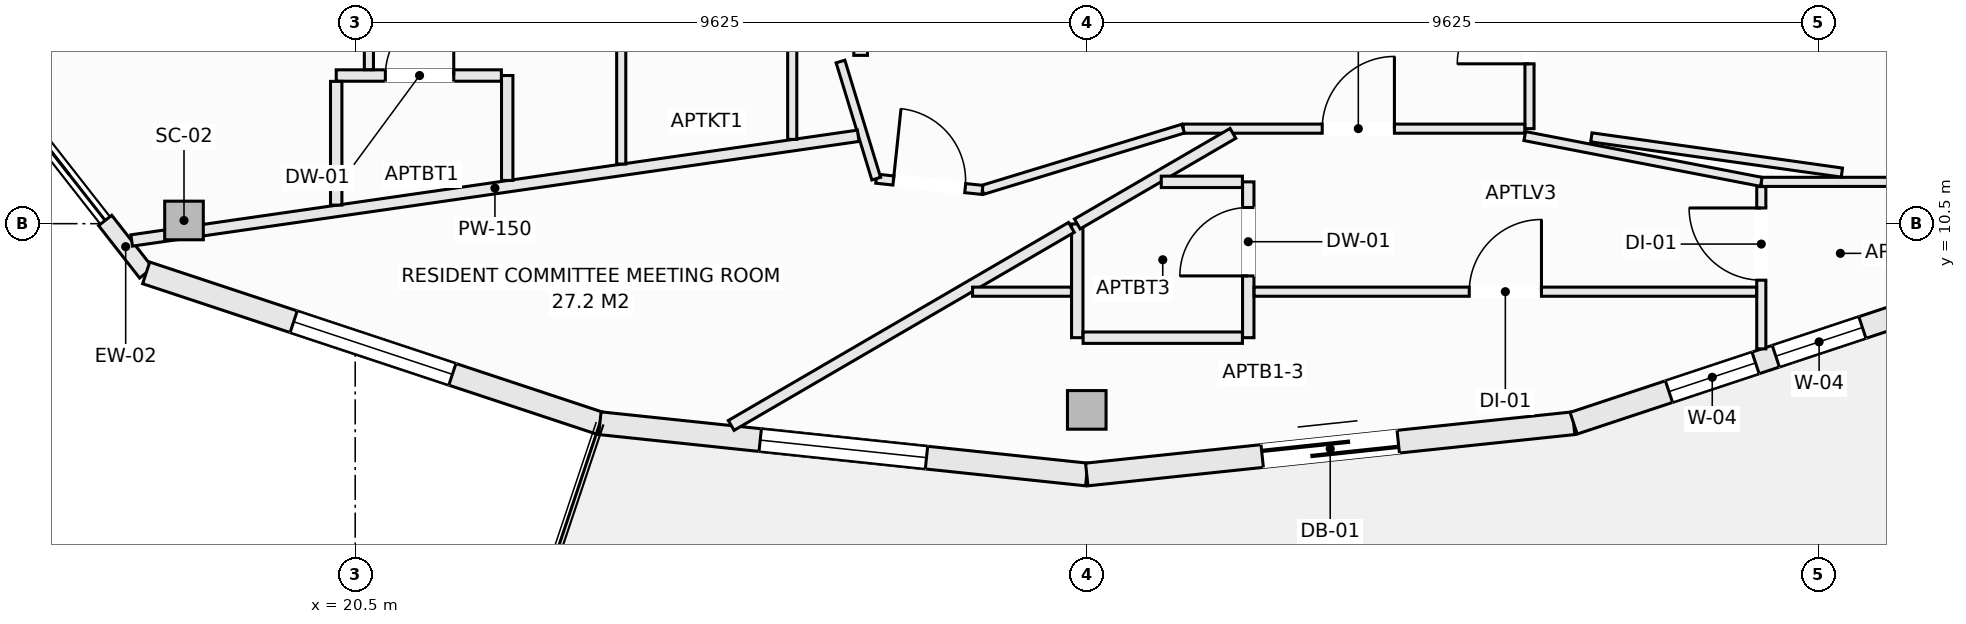
"""IFC4 building model, lengths in metres.
Left out: names, types, materials, properties, quantities, classifications, styles, units other than length and angle.
Written with IfcOpenShell. Run it as: python <this file> out.ifc"""

import sys

from ifc_helpers import new_model, si_unit, direction, frame, frame_2d, origin, origin_2d, place, context, subcontext, project, spatial, rectangle, hollow_rectangle, extrude, element, fill, save


model = new_model("IFC4")
c1 = context("Model", 3, precision=1e-05, world=origin(), true_north=direction((0.0, 1.0)))
c2 = subcontext(c1, "Body", "Model", "MODEL_VIEW")
j1 = project(units=[si_unit("LENGTHUNIT", "METRE"), si_unit("PLANEANGLEUNIT", "RADIAN")], contexts=[c1])
p1 = place(None, origin())
s1 = spatial("IfcSite", under=j1, at=p1, CompositionType="ELEMENT")
p2 = place(p1, origin())
s2 = spatial("IfcBuilding", under=s1, at=p2, CompositionType="ELEMENT")
p3 = place(p2, frame((0.0, 0.0, 226.1)))
s3 = spatial("IfcBuildingStorey", under=s2, at=p3, CompositionType="ELEMENT", Elevation=226.1)
for number, where, z_axis, x_axis in (
    (1, (18.247, 10.542, -0.27), (0.0, 0.0, 1.0), (1.0, 0.0, 0.0)),
    (2, (30.125, 8.05, -0.27), (0.0, 0.0, 1.0), (1.0, 0.0, 0.0)),
):
    element("IfcColumn", number, at=place(p3, frame(where, z_axis=z_axis, x_axis=x_axis)), inside=s3, PredefinedType="COLUMN", context=c2, shape_type="SweptSolid", body=[
        extrude(hollow_rectangle(XDim=0.508, YDim=0.508, WallThickness=0.019, at=origin_2d()), origin(), (0.0, 0.0, 1.0), 3.3),
    ])
p4 = place(p3, frame((17.21, 10.542, 0.0), z_axis=(0.0, 0.0, 1.0), x_axis=(0.616466126167, -0.787381429352, 0.0)))
e3 = element("IfcWall", 3, at=p4, inside=s3, PredefinedType="SOLIDWALL", context=c2, shape_type="SweptSolid", body=[
    extrude(rectangle(XDim=0.876, YDim=0.22, at=frame_2d((0.438, 0.0))), origin(), (0.0, 0.0, 1.0), 2.605),
])
p5 = place(p3, frame((17.75, 9.853, 0.0), z_axis=(0.0, 0.0, 1.0), x_axis=(0.949240877604, -0.314550085495, 0.0)))
e4 = element("IfcWall", 4, at=p5, inside=s3, PredefinedType="SOLIDWALL", context=c2, shape_type="SweptSolid", body=[
    extrude(rectangle(XDim=6.288, YDim=0.3, at=frame_2d((3.144, 0.0))), origin(), (0.0, 0.0, 1.0), 2.605),
])
p6 = place(p5, frame((2.044, 0.0, 0.72)))
e5 = element("IfcOpeningElement", 5, at=p6, cuts=e4, PredefinedType="OPENING", context=c2, shape_type="SweptSolid", body=[
    extrude(rectangle(XDim=2.2, YDim=1.65, at=frame_2d((1.1, 0.825))), frame((0.0, 0.16, 0.0), z_axis=(0.0, -1.0, 0.0), x_axis=(1.0, 0.0, 0.0)), (0.0, 0.0, 1.0), 0.32),
])
p7 = place(p3, frame((23.719, 7.875, 0.0), z_axis=(0.0, 0.0, 1.0), x_axis=(0.994497142298, -0.104763705363, 0.0)))
e6 = element("IfcWall", 6, at=p7, inside=s3, PredefinedType="SOLIDWALL", context=c2, shape_type="SweptSolid", body=[
    extrude(rectangle(XDim=6.441, YDim=0.3, at=frame_2d((3.221, 0.0))), origin(), (0.0, 0.0, 1.0), 2.605),
])
p8 = place(p7, frame((2.121, 0.0, 0.72)))
e7 = element("IfcOpeningElement", 7, at=p8, cuts=e6, PredefinedType="OPENING", context=c2, shape_type="SweptSolid", body=[
    extrude(rectangle(XDim=2.2, YDim=1.65, at=frame_2d((1.1, 0.825))), frame((0.0, 0.16, 0.0), z_axis=(0.0, -1.0, 0.0), x_axis=(1.0, 0.0, 0.0)), (0.0, 0.0, 1.0), 0.32),
])
p9 = place(p3, frame((30.125, 7.2, 0.0), z_axis=(0.0, 0.0, 1.0), x_axis=(0.994497142298, 0.104763705363, 0.0)))
e8 = element("IfcWall", 8, at=p9, inside=s3, PredefinedType="SOLIDWALL", context=c2, shape_type="SweptSolid", body=[
    extrude(rectangle(XDim=6.441, YDim=0.3, at=frame_2d((3.221, 0.0))), origin(), (0.0, 0.0, 1.0), 2.605),
])
p10 = place(p9, frame((2.321, 0.0, 0.0)))
e9 = element("IfcOpeningElement", 9, at=p10, cuts=e8, PredefinedType="OPENING", context=c2, shape_type="SweptSolid", body=[
    extrude(rectangle(XDim=1.8, YDim=2.25, at=frame_2d((0.9, 1.125))), frame((0.0, 0.16, 0.0), z_axis=(0.0, -1.0, 0.0), x_axis=(1.0, 0.0, 0.0)), (0.0, 0.0, 1.0), 0.32),
])
p11 = place(p3, frame((36.531, 7.875, 0.0), z_axis=(0.0, 0.0, 1.0), x_axis=(0.949240877604, 0.314550085495, 0.0)))
e10 = element("IfcWall", 10, at=p11, inside=s3, PredefinedType="SOLIDWALL", context=c2, shape_type="SweptSolid", body=[
    extrude(rectangle(XDim=6.288, YDim=0.3, at=frame_2d((3.144, 0.0))), origin(), (0.0, 0.0, 1.0), 2.605),
])
p12 = place(p11, frame((1.322, 0.0, 0.72)))
e11 = element("IfcOpeningElement", 11, at=p12, cuts=e10, PredefinedType="OPENING", context=c2, shape_type="SweptSolid", body=[
    extrude(rectangle(XDim=1.2, YDim=1.65, at=frame_2d((0.6, 0.825))), frame((0.0, 0.16, 0.0), z_axis=(0.0, -1.0, 0.0), x_axis=(1.0, 0.0, 0.0)), (0.0, 0.0, 1.0), 0.32),
])
p13 = place(p11, frame((2.802, 0.0, 0.72)))
e12 = element("IfcOpeningElement", 12, at=p13, cuts=e10, PredefinedType="OPENING", context=c2, shape_type="SweptSolid", body=[
    extrude(rectangle(XDim=1.2, YDim=1.65, at=frame_2d((0.6, 0.825))), frame((0.0, 0.16, 0.0), z_axis=(0.0, -1.0, 0.0), x_axis=(1.0, 0.0, 0.0)), (0.0, 0.0, 1.0), 0.32),
])
p14 = place(p3, frame((37.565, 4.653, 0.0), z_axis=(0.0, 0.0, 1.0), x_axis=(0.941780086523, 0.336229488042, 0.0)))
e13 = element("IfcWall", 13, at=p14, inside=s3, PredefinedType="PARAPET", context=c2, shape_type="SweptSolid", body=[
    extrude(rectangle(XDim=7.378, YDim=0.22, at=frame_2d((3.689, 0.0))), origin(), (0.0, 0.0, 1.0), 0.52),
])
p15 = place(p3, frame((27.15, 12.714, 0.0), z_axis=(0.0, 0.0, 1.0), x_axis=(0.0, 1.0, 0.0)))
e14 = element("IfcWall", 14, at=p15, inside=s3, PredefinedType="SOLIDWALL", context=c2, shape_type="SweptSolid", body=[
    extrude(rectangle(XDim=4.244, YDim=0.18, at=frame_2d((2.122, 0.0))), origin(), (0.0, 0.0, 1.0), 3.03),
])
p16 = place(p15, frame((0.928, 0.0, 0.0)))
e15 = element("IfcOpeningElement", 15, at=p16, cuts=e14, PredefinedType="OPENING", context=c2, shape_type="SweptSolid", body=[
    extrude(rectangle(XDim=0.95, YDim=2.1, at=frame_2d((0.475, 1.05))), frame((0.0, 0.1, 0.0), z_axis=(0.0, -1.0, 0.0), x_axis=(1.0, 0.0, 0.0)), (0.0, 0.0, 1.0), 0.2),
])
p17 = place(p15, frame((2.64, 0.0, 0.0)))
e16 = element("IfcOpeningElement", 16, at=p17, cuts=e14, PredefinedType="OPENING", context=c2, shape_type="SweptSolid", body=[
    extrude(rectangle(XDim=0.95, YDim=2.1, at=frame_2d((0.475, 1.05))), frame((0.0, 0.1, 0.0), z_axis=(0.0, -1.0, 0.0), x_axis=(1.0, 0.0, 0.0)), (0.0, 0.0, 1.0), 0.2),
])
p18 = place(p3, frame((30.0, 9.0, 0.0), z_axis=(0.0, 0.0, 1.0), x_axis=(0.0, 1.0, 0.0)))
e17 = element("IfcWall", 17, at=p18, inside=s3, PredefinedType="PARTITIONING", context=c2, shape_type="SweptSolid", body=[
    extrude(rectangle(XDim=1.496, YDim=0.15, at=frame_2d((0.748, 0.0))), origin(), (0.0, 0.0, 1.0), 2.77),
])
p19 = place(p3, frame((35.95, 11.75, 0.0), z_axis=(0.0, 0.0, 1.0), x_axis=(0.0, 1.0, 0.0)))
e18 = element("IfcWall", 18, at=p19, inside=s3, PredefinedType="PARTITIONING", context=c2, shape_type="SweptSolid", body=[
    extrude(rectangle(XDim=3.2, YDim=0.12, at=frame_2d((1.6, 0.0))), origin(), (0.0, 0.0, 1.0), 3.03),
])
p20 = place(p19, frame((0.853, 0.0, 0.0)))
e19 = element("IfcOpeningElement", 19, at=p20, cuts=e18, PredefinedType="OPENING", context=c2, shape_type="SweptSolid", body=[
    extrude(rectangle(XDim=0.95, YDim=2.1, at=frame_2d((0.475, 1.05))), frame((0.0, 0.07, 0.0), z_axis=(0.0, -1.0, 0.0), x_axis=(1.0, 0.0, 0.0)), (0.0, 0.0, 1.0), 0.14),
])
p21 = place(p3, frame((31.393, 11.75, 0.0), z_axis=(0.0, 0.0, 1.0), x_axis=(1.0, 0.0, 0.0)))
e20 = element("IfcWall", 20, at=p21, inside=s3, PredefinedType="PARTITIONING", context=c2, shape_type="SweptSolid", body=[
    extrude(rectangle(XDim=4.495, YDim=0.12, at=frame_2d((2.248, 0.0))), origin(), (0.0, 0.0, 1.0), 3.03),
])
p22 = place(p21, frame((1.83, 0.0, 0.0)))
e21 = element("IfcOpeningElement", 21, at=p22, cuts=e20, PredefinedType="OPENING", context=c2, shape_type="SweptSolid", body=[
    extrude(rectangle(XDim=0.95, YDim=2.1, at=frame_2d((0.475, 1.05))), frame((0.0, 0.07, 0.0), z_axis=(0.0, -1.0, 0.0), x_axis=(1.0, 0.0, 0.0)), (0.0, 0.0, 1.0), 0.14),
])
p23 = place(p3, frame((28.752, 10.944, 0.0), z_axis=(0.0, 0.0, 1.0), x_axis=(0.956462690075, 0.291854625618, 0.0)))
e22 = element("IfcWall", 22, at=p23, inside=s3, PredefinedType="PARTITIONING", context=c2, shape_type="SweptSolid", body=[
    extrude(rectangle(XDim=2.761, YDim=0.12, at=frame_2d((1.381, 0.0))), origin(), (0.0, 0.0, 1.0), 3.03),
])
p24 = place(p3, frame((27.355, 11.092, 0.0), z_axis=(0.0, 0.0, 1.0), x_axis=(0.994438591301, -0.105318033263, 0.0)))
e23 = element("IfcWall", 23, at=p24, inside=s3, PredefinedType="PARTITIONING", context=c2, shape_type="SweptSolid", body=[
    extrude(rectangle(XDim=1.405, YDim=0.12, at=frame_2d((0.702, 0.0))), origin(), (0.0, 0.0, 1.0), 3.03),
])
p25 = place(p24, frame((0.227, 0.0, 0.0)))
e24 = element("IfcOpeningElement", 24, at=p25, cuts=e23, PredefinedType="OPENING", context=c2, shape_type="SweptSolid", body=[
    extrude(rectangle(XDim=0.95, YDim=2.1, at=frame_2d((0.475, 1.05))), frame((0.0, 0.07, 0.0), z_axis=(0.0, -1.0, 0.0), x_axis=(1.0, 0.0, 0.0)), (0.0, 0.0, 1.0), 0.14),
])
p26 = place(p3, frame((26.885, 12.633, 0.0), z_axis=(0.0, 0.0, 1.0), x_axis=(0.291710302586, -0.956506716843, 0.0)))
e25 = element("IfcWall", 25, at=p26, inside=s3, PredefinedType="PARTITIONING", context=c2, shape_type="SweptSolid", body=[
    extrude(rectangle(XDim=1.611, YDim=0.12, at=frame_2d((0.806, 0.0))), origin(), (0.0, 0.0, 1.0), 3.03),
])
p27 = place(p3, frame((17.559, 10.279, 0.0), z_axis=(0.0, 0.0, 1.0), x_axis=(0.989781460933, 0.142592635129, 0.0)))
e26 = element("IfcWall", 26, at=p27, inside=s3, PredefinedType="PARTITIONING", context=c2, shape_type="SweptSolid", body=[
    extrude(rectangle(XDim=9.658, YDim=0.15, at=frame_2d((4.829, 0.0))), origin(), (0.0, 0.0, 1.0), 2.605),
])
p28 = place(p3, frame((26.25, 11.609, 0.0), z_axis=(0.0, 0.0, 1.0), x_axis=(0.0, 1.0, 0.0)))
e27 = element("IfcWall", 27, at=p28, inside=s3, PredefinedType="PARTITIONING", context=c2, shape_type="SweptSolid", body=[
    extrude(rectangle(XDim=1.691, YDim=0.12, at=frame_2d((0.846, 0.0))), origin(), (0.0, 0.0, 1.0), 3.03),
])
p29 = place(p3, frame((24.0, 11.285, 0.0), z_axis=(0.0, 0.0, 1.0), x_axis=(0.0, 1.0, 0.0)))
e28 = element("IfcWall", 28, at=p29, inside=s3, PredefinedType="PARTITIONING", context=c2, shape_type="SweptSolid", body=[
    extrude(rectangle(XDim=1.953, YDim=0.12, at=frame_2d((0.977, 0.0))), origin(), (0.0, 0.0, 1.0), 3.03),
])
p30 = place(p3, frame((22.5, 11.069, 0.0), z_axis=(0.0, 0.0, 1.0), x_axis=(0.0, 1.0, 0.0)))
e29 = element("IfcWall", 29, at=p30, inside=s3, PredefinedType="PARTITIONING", context=c2, shape_type="SweptSolid", body=[
    extrude(rectangle(XDim=1.38, YDim=0.15, at=frame_2d((0.69, 0.0))), origin(), (0.0, 0.0, 1.0), 3.03),
])
p31 = place(p3, frame((20.25, 12.449, 0.0), z_axis=(0.0, 0.0, 1.0), x_axis=(1.0, 0.0, 0.0)))
e30 = element("IfcWall", 30, at=p31, inside=s3, PredefinedType="PARTITIONING", context=c2, shape_type="SweptSolid", body=[
    extrude(rectangle(XDim=2.173, YDim=0.15, at=frame_2d((1.086, 0.0))), origin(), (0.0, 0.0, 1.0), 3.03),
])
p32 = place(p31, frame((0.646, 0.0, 0.0)))
e31 = element("IfcOpeningElement", 31, at=p32, cuts=e30, PredefinedType="OPENING", context=c2, shape_type="SweptSolid", body=[
    extrude(rectangle(XDim=0.9, YDim=2.1, at=frame_2d((0.45, 1.05))), frame((0.0, 0.085, 0.0), z_axis=(0.0, -1.0, 0.0), x_axis=(1.0, 0.0, 0.0)), (0.0, 0.0, 1.0), 0.17),
])
p33 = place(p3, frame((20.68, 12.526, 0.0), z_axis=(0.0, 0.0, 1.0), x_axis=(0.0, 1.0, 0.0)))
e32 = element("IfcWall", 32, at=p33, inside=s3, PredefinedType="PARTITIONING", context=c2, shape_type="SweptSolid", body=[
    extrude(rectangle(XDim=2.379, YDim=0.12, at=frame_2d((1.189, 0.0))), origin(), (0.0, 0.0, 1.0), 2.478),
])
p34 = place(p33, frame((0.715, 0.0, 0.0)))
e33 = element("IfcOpeningElement", 33, at=p34, cuts=e32, PredefinedType="OPENING", context=c2, shape_type="SweptSolid", body=[
    extrude(rectangle(XDim=0.95, YDim=2.1, at=frame_2d((0.475, 1.05))), frame((0.0, 0.07, 0.0), z_axis=(0.0, -1.0, 0.0), x_axis=(1.0, 0.0, 0.0)), (0.0, 0.0, 1.0), 0.14),
])
p35 = place(p3, frame((20.25, 10.744, 0.0), z_axis=(0.0, 0.0, 1.0), x_axis=(0.0, 1.0, 0.0)))
e34 = element("IfcWall", 34, at=p35, inside=s3, PredefinedType="PARTITIONING", context=c2, shape_type="SweptSolid", body=[
    extrude(rectangle(XDim=1.628, YDim=0.15, at=frame_2d((0.814, 0.0))), origin(), (0.0, 0.0, 1.0), 3.03),
])
p36 = place(p3, frame((25.447, 7.846, 0.0), z_axis=(0.0, 0.0, 1.0), x_axis=(0.864279409289, 0.503012030353, 0.0)))
e35 = element("IfcWall", 35, at=p36, inside=s3, PredefinedType="PARTITIONING", context=c2, shape_type="SweptSolid", body=[
    extrude(rectangle(XDim=5.179, YDim=0.15, at=frame_2d((2.59, 0.0))), origin(), (0.0, 0.0, 1.0), 3.03),
])
p37 = place(p3, frame((30.0, 10.496, 0.0), z_axis=(0.0, 0.0, 1.0), x_axis=(0.864297850125, 0.50298034382, 0.0)))
e36 = element("IfcWall", 36, at=p37, inside=s3, PredefinedType="PARTITIONING", context=c2, shape_type="SweptSolid", body=[
    extrude(rectangle(XDim=2.37, YDim=0.15, at=frame_2d((1.185, 0.0))), origin(), (0.0, 0.0, 1.0), 3.03),
])
p38 = place(p3, frame((32.25, 9.0, 0.0), z_axis=(0.0, 0.0, 1.0), x_axis=(0.0, 1.0, 0.0)))
e37 = element("IfcWall", 37, at=p38, inside=s3, PredefinedType="PARTITIONING", context=c2, shape_type="SweptSolid", body=[
    extrude(rectangle(XDim=2.05, YDim=0.15, at=frame_2d((1.025, 0.0))), origin(), (0.0, 0.0, 1.0), 3.03),
])
p39 = place(p38, frame((0.812, 0.0, 0.0)))
e38 = element("IfcOpeningElement", 38, at=p39, cuts=e37, PredefinedType="OPENING", context=c2, shape_type="SweptSolid", body=[
    extrude(rectangle(XDim=0.9, YDim=2.1, at=frame_2d((0.45, 1.05))), frame((0.0, 0.085, 0.0), z_axis=(0.0, -1.0, 0.0), x_axis=(1.0, 0.0, 0.0)), (0.0, 0.0, 1.0), 0.17),
])
p40 = place(p3, frame((31.105, 11.05, 0.0), z_axis=(0.0, 0.0, 1.0), x_axis=(1.0, 0.0, 0.0)))
e39 = element("IfcWall", 39, at=p40, inside=s3, PredefinedType="PARTITIONING", context=c2, shape_type="SweptSolid", body=[
    extrude(rectangle(XDim=1.068, YDim=0.15, at=frame_2d((0.534, 0.0))), origin(), (0.0, 0.0, 1.0), 3.03),
])
p41 = place(p3, frame((39.0, 11.05, 0.0), z_axis=(0.0, 0.0, 1.0), x_axis=(1.0, 0.0, 0.0)))
e40 = element("IfcWall", 40, at=p41, inside=s3, PredefinedType="PARTITIONING", context=c2, shape_type="SweptSolid", body=[
    extrude(rectangle(XDim=1.754, YDim=0.12, at=frame_2d((0.877, 0.0))), origin(), (0.0, 0.0, 1.0), 3.03),
])
p42 = place(p3, frame((35.888, 11.652, 0.0), z_axis=(0.0, 0.0, 1.0), x_axis=(0.981782168089, -0.190009932429, 0.0)))
e41 = element("IfcWall", 41, at=p42, inside=s3, PredefinedType="PARTITIONING", context=c2, shape_type="SweptSolid", body=[
    extrude(rectangle(XDim=3.17, YDim=0.12, at=frame_2d((1.585, 0.0))), origin(), (0.0, 0.0, 1.0), 3.03),
])
p43 = place(p3, frame((39.0, 8.853, 0.0), z_axis=(0.0, 0.0, 1.0), x_axis=(0.0, 1.0, 0.0)))
e42 = element("IfcWall", 42, at=p43, inside=s3, PredefinedType="PARTITIONING", context=c2, shape_type="SweptSolid", body=[
    extrude(rectangle(XDim=2.135, YDim=0.12, at=frame_2d((1.067, 0.0))), origin(), (0.0, 0.0, 1.0), 3.03),
])
p44 = place(p43, frame((0.904, 0.0, 0.0)))
e43 = element("IfcOpeningElement", 43, at=p44, cuts=e42, PredefinedType="OPENING", context=c2, shape_type="SweptSolid", body=[
    extrude(rectangle(XDim=0.95, YDim=2.1, at=frame_2d((0.475, 1.05))), frame((0.0, 0.07, 0.0), z_axis=(0.0, -1.0, 0.0), x_axis=(1.0, 0.0, 0.0)), (0.0, 0.0, 1.0), 0.14),
])
p45 = place(p3, frame((28.623, 9.605, 0.0), z_axis=(0.0, 0.0, 1.0), x_axis=(1.0, 0.0, 0.0)))
e44 = element("IfcWall", 44, at=p45, inside=s3, PredefinedType="PARTITIONING", context=c2, shape_type="SweptSolid", body=[
    extrude(rectangle(XDim=1.3, YDim=0.12, at=frame_2d((0.65, 0.0))), origin(), (0.0, 0.0, 1.0), 3.03),
])
p46 = place(p3, frame((32.327, 9.605, 0.0), z_axis=(0.0, 0.0, 1.0), x_axis=(1.0, 0.0, 0.0)))
e45 = element("IfcWall", 45, at=p46, inside=s3, PredefinedType="PARTITIONING", context=c2, shape_type="SweptSolid", body=[
    extrude(rectangle(XDim=6.611, YDim=0.12, at=frame_2d((3.306, 0.0))), origin(), (0.0, 0.0, 1.0), 2.605),
])
p47 = place(p46, frame((2.831, 0.0, 0.0)))
e46 = element("IfcOpeningElement", 46, at=p47, cuts=e45, PredefinedType="OPENING", context=c2, shape_type="SweptSolid", body=[
    extrude(rectangle(XDim=0.95, YDim=2.1, at=frame_2d((0.475, 1.05))), frame((0.0, 0.07, 0.0), z_axis=(0.0, -1.0, 0.0), x_axis=(1.0, 0.0, 0.0)), (0.0, 0.0, 1.0), 0.14),
])
p48 = place(p3, frame((30.077, 9.0, 0.0), z_axis=(0.0, 0.0, 1.0), x_axis=(1.0, 0.0, 0.0)))
e47 = element("IfcWall", 47, at=p48, inside=s3, PredefinedType="PARTITIONING", context=c2, shape_type="SweptSolid", body=[
    extrude(rectangle(XDim=2.096, YDim=0.15, at=frame_2d((1.048, 0.0))), origin(), (0.0, 0.0, 1.0), 3.03),
])
p49 = place(p3, frame((36.764, 11.635, 0.0), z_axis=(0.0, 0.0, 1.0), x_axis=(0.990262425383, -0.139213249639, 0.0)))
e48 = element("IfcWall", 48, at=p49, inside=s3, PredefinedType="PARTITIONING", context=c2, shape_type="SweptSolid", body=[
    extrude(rectangle(XDim=3.329, YDim=0.12, at=frame_2d((1.664, 0.0))), origin(), (0.0, 0.0, 1.0), 3.03),
])
p50 = place(p6, origin())
e49 = element("IfcWindow", 49, at=p50, inside=s3, PartitioningType="SINGLE_PANEL", PredefinedType="WINDOW", context=c2, shape_type="SweptSolid", body=[
    extrude(rectangle(XDim=2.2, YDim=1.65, at=frame_2d((1.1, 0.825))), frame((0.0, 0.03, 0.0), z_axis=(0.0, -1.0, 0.0), x_axis=(1.0, 0.0, 0.0)), (0.0, 0.0, 1.0), 0.06),
])
fill(e5, e49)
p51 = place(p8, origin())
e50 = element("IfcWindow", 50, at=p51, inside=s3, PartitioningType="SINGLE_PANEL", PredefinedType="WINDOW", context=c2, shape_type="SweptSolid", body=[
    extrude(rectangle(XDim=2.2, YDim=1.65, at=frame_2d((1.1, 0.825))), frame((0.0, 0.03, 0.0), z_axis=(0.0, -1.0, 0.0), x_axis=(1.0, 0.0, 0.0)), (0.0, 0.0, 1.0), 0.06),
])
fill(e7, e50)
p52 = place(p10, frame((1.8, 0.0, 0.0), z_axis=(0.0, 0.0, 1.0), x_axis=(-1.0, 0.0, 0.0)))
e51 = element("IfcDoor", 51, at=p52, inside=s3, OperationType="SLIDING_TO_LEFT", PredefinedType="DOOR", context=c2, shape_type="SweptSolid", body=[
    extrude(rectangle(XDim=1.8, YDim=2.25, at=frame_2d((0.9, 1.125))), frame((0.0, 0.025, 0.0), z_axis=(0.0, -1.0, 0.0), x_axis=(1.0, 0.0, 0.0)), (0.0, 0.0, 1.0), 0.05),
])
fill(e9, e51)
p53 = place(p12, origin())
e52 = element("IfcWindow", 52, at=p53, inside=s3, PartitioningType="SINGLE_PANEL", PredefinedType="WINDOW", context=c2, shape_type="SweptSolid", body=[
    extrude(rectangle(XDim=1.2, YDim=1.65, at=frame_2d((0.6, 0.825))), frame((0.0, 0.03, 0.0), z_axis=(0.0, -1.0, 0.0), x_axis=(1.0, 0.0, 0.0)), (0.0, 0.0, 1.0), 0.06),
])
fill(e11, e52)
p54 = place(p25, origin())
e53 = element("IfcDoor", 53, at=p54, inside=s3, OperationType="SINGLE_SWING_LEFT", PredefinedType="DOOR", context=c2, shape_type="SweptSolid", body=[
    extrude(rectangle(XDim=0.95, YDim=2.1, at=frame_2d((0.475, 1.05))), frame((0.0, 0.025, 0.0), z_axis=(0.0, -1.0, 0.0), x_axis=(1.0, 0.0, 0.0)), (0.0, 0.0, 1.0), 0.05),
])
fill(e24, e53)
p55 = place(p22, origin())
e54 = element("IfcDoor", 54, at=p55, inside=s3, OperationType="SINGLE_SWING_RIGHT", PredefinedType="DOOR", context=c2, shape_type="SweptSolid", body=[
    extrude(rectangle(XDim=0.95, YDim=2.1, at=frame_2d((0.475, 1.05))), frame((0.0, 0.025, 0.0), z_axis=(0.0, -1.0, 0.0), x_axis=(1.0, 0.0, 0.0)), (0.0, 0.0, 1.0), 0.05),
])
fill(e21, e54)
p56 = place(p20, origin())
e55 = element("IfcDoor", 55, at=p56, inside=s3, OperationType="SINGLE_SWING_LEFT", PredefinedType="DOOR", context=c2, shape_type="SweptSolid", body=[
    extrude(rectangle(XDim=0.95, YDim=2.1, at=frame_2d((0.475, 1.05))), frame((0.0, 0.025, 0.0), z_axis=(0.0, -1.0, 0.0), x_axis=(1.0, 0.0, 0.0)), (0.0, 0.0, 1.0), 0.05),
])
fill(e19, e55)
p57 = place(p32, origin())
e56 = element("IfcDoor", 56, at=p57, inside=s3, OperationType="SINGLE_SWING_RIGHT", PredefinedType="DOOR", context=c2, shape_type="SweptSolid", body=[
    extrude(rectangle(XDim=0.9, YDim=2.1, at=frame_2d((0.45, 1.05))), frame((0.0, 0.025, 0.0), z_axis=(0.0, -1.0, 0.0), x_axis=(1.0, 0.0, 0.0)), (0.0, 0.0, 1.0), 0.05),
])
fill(e31, e56)
p58 = place(p44, origin())
e57 = element("IfcDoor", 57, at=p58, inside=s3, OperationType="SINGLE_SWING_RIGHT", PredefinedType="DOOR", context=c2, shape_type="SweptSolid", body=[
    extrude(rectangle(XDim=0.95, YDim=2.1, at=frame_2d((0.475, 1.05))), frame((0.0, 0.025, 0.0), z_axis=(0.0, -1.0, 0.0), x_axis=(1.0, 0.0, 0.0)), (0.0, 0.0, 1.0), 0.05),
])
fill(e43, e57)
p59 = place(p39, origin())
e58 = element("IfcDoor", 58, at=p59, inside=s3, OperationType="SINGLE_SWING_LEFT", PredefinedType="DOOR", context=c2, shape_type="SweptSolid", body=[
    extrude(rectangle(XDim=0.9, YDim=2.1, at=frame_2d((0.45, 1.05))), frame((0.0, 0.025, 0.0), z_axis=(0.0, -1.0, 0.0), x_axis=(1.0, 0.0, 0.0)), (0.0, 0.0, 1.0), 0.05),
])
fill(e38, e58)
p60 = place(p47, origin())
e59 = element("IfcDoor", 59, at=p60, inside=s3, OperationType="SINGLE_SWING_RIGHT", PredefinedType="DOOR", context=c2, shape_type="SweptSolid", body=[
    extrude(rectangle(XDim=0.95, YDim=2.1, at=frame_2d((0.475, 1.05))), frame((0.0, 0.025, 0.0), z_axis=(0.0, -1.0, 0.0), x_axis=(1.0, 0.0, 0.0)), (0.0, 0.0, 1.0), 0.05),
])
fill(e46, e59)
p61 = place(p13, origin())
e60 = element("IfcWindow", 60, at=p61, inside=s3, PartitioningType="SINGLE_PANEL", PredefinedType="WINDOW", context=c2, shape_type="SweptSolid", body=[
    extrude(rectangle(XDim=1.2, YDim=1.65, at=frame_2d((0.6, 0.825))), frame((0.0, 0.03, 0.0), z_axis=(0.0, -1.0, 0.0), x_axis=(1.0, 0.0, 0.0)), (0.0, 0.0, 1.0), 0.06),
])
fill(e12, e60)
save(model, sys.argv[1])
